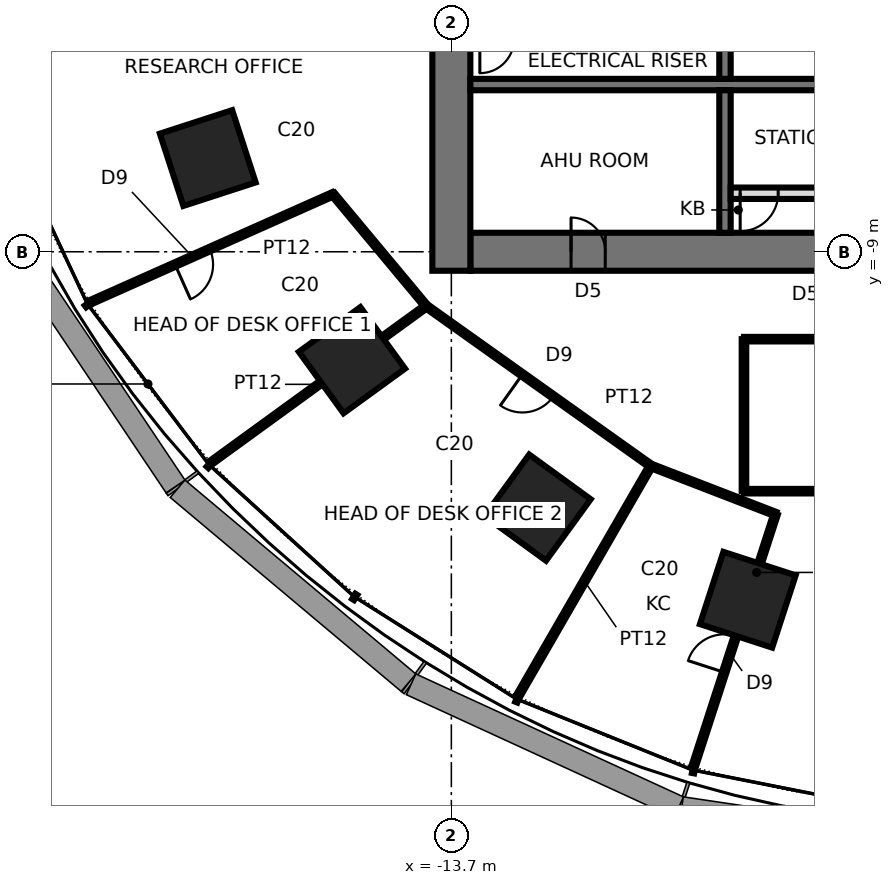
"""IFC4 building model, lengths in metres.
Left out: names, types, materials, properties, quantities, classifications, styles, units other than length and angle.
Written with IfcOpenShell. Run it as: python <this file> out.ifc"""

import sys

from ifc_helpers import new_model, si_unit, direction, frame, frame_2d, origin, origin_2d, place, context, subcontext, project, spatial, rectangle, extrude, element, fill, save


model = new_model("IFC4")
c1 = context("Model", 3, precision=1e-05, world=origin(), true_north=direction((0.0, 1.0)))
c2 = subcontext(c1, "Body", "Model", "MODEL_VIEW")
j1 = project(units=[si_unit("LENGTHUNIT", "METRE"), si_unit("PLANEANGLEUNIT", "RADIAN")], contexts=[c1])
p1 = place(None, origin())
s1 = spatial("IfcSite", under=j1, at=p1, CompositionType="ELEMENT")
p2 = place(p1, origin())
s2 = spatial("IfcBuilding", under=s1, at=p2, CompositionType="ELEMENT")
p3 = place(p2, frame((0.0, 0.0, 57.4)))
s3 = spatial("IfcBuildingStorey", under=s2, at=p3, CompositionType="ELEMENT", Elevation=57.4)
for number, where, z_axis, x_axis in (
    (1, (-20.109, -6.534, 0.0), (0.0, 0.0, 1.0), (-0.951, -0.309, 0.0)),
    (2, (-16.315, -11.854, 0.0), (0.0, 0.0, 1.0), (-0.809, -0.588, 0.0)),
    (3, (-11.43, -15.733, 0.0), (0.0, 0.0, 1.0), (-0.588, -0.809, 0.0)),
    (4, (-5.9, -18.157, 0.0), (0.0, 0.0, 1.0), (-0.309, -0.951, 0.0)),
):
    element("IfcColumn", number, at=place(p3, frame(where, z_axis=z_axis, x_axis=x_axis)), inside=s3, PredefinedType="COLUMN", context=c2, shape_type="SweptSolid", body=[
        extrude(rectangle(XDim=2.0, YDim=2.0, at=origin_2d()), origin(), (0.0, 0.0, 1.0), 4.2),
    ])
p4 = place(p3, frame((-13.2, -9.0, 0.0), z_axis=(0.0, 0.0, 1.0), x_axis=(1.0, 0.0, 0.0)))
e5 = element("IfcWall", 5, at=p4, inside=s3, PredefinedType="SHEAR", context=c2, shape_type="SweptSolid", body=[
    extrude(rectangle(XDim=26.4, YDim=1.0, at=frame_2d((13.2, 0.0))), origin(), (0.0, 0.0, 1.0), 4.2),
])
p5 = place(p4, frame((2.65, 0.0, 0.0)))
e6 = element("IfcOpeningElement", 6, at=p5, cuts=e5, PredefinedType="OPENING", context=c2, shape_type="SweptSolid", body=[
    extrude(rectangle(XDim=0.9, YDim=2.1, at=frame_2d((0.45, 1.05))), frame((0.0, 0.51, 0.0), z_axis=(0.0, -1.0, 0.0), x_axis=(1.0, 0.0, 0.0)), (0.0, 0.0, 1.0), 1.02),
])
p6 = place(p4, frame((9.5, 0.0, 0.0)))
e7 = element("IfcOpeningElement", 7, at=p6, cuts=e5, PredefinedType="OPENING", context=c2, shape_type="SweptSolid", body=[
    extrude(rectangle(XDim=0.9, YDim=2.1, at=frame_2d((0.45, 1.05))), frame((0.0, 0.51, 0.0), z_axis=(0.0, -1.0, 0.0), x_axis=(1.0, 0.0, 0.0)), (0.0, 0.0, 1.0), 1.02),
])
p7 = place(p4, frame((16.0, 0.0, 0.0)))
e8 = element("IfcOpeningElement", 8, at=p7, cuts=e5, PredefinedType="OPENING", context=c2, shape_type="SweptSolid", body=[
    extrude(rectangle(XDim=0.9, YDim=2.1, at=frame_2d((0.45, 1.05))), frame((0.0, 0.51, 0.0), z_axis=(0.0, -1.0, 0.0), x_axis=(1.0, 0.0, 0.0)), (0.0, 0.0, 1.0), 1.02),
])
p8 = place(p4, frame((22.85, 0.0, 0.0)))
e9 = element("IfcOpeningElement", 9, at=p8, cuts=e5, PredefinedType="OPENING", context=c2, shape_type="SweptSolid", body=[
    extrude(rectangle(XDim=0.9, YDim=2.1, at=frame_2d((0.45, 1.05))), frame((0.0, 0.51, 0.0), z_axis=(0.0, -1.0, 0.0), x_axis=(1.0, 0.0, 0.0)), (0.0, 0.0, 1.0), 1.02),
])
p9 = place(p3, frame((-13.7, 9.5, 0.0), z_axis=(0.0, 0.0, 1.0), x_axis=(0.0, -1.0, 0.0)))
e10 = element("IfcWall", 10, at=p9, inside=s3, PredefinedType="SHEAR", context=c2, shape_type="SweptSolid", body=[
    extrude(rectangle(XDim=19.0, YDim=1.0, at=frame_2d((9.5, 0.0))), origin(), (0.0, 0.0, 1.0), 4.2),
])
p10 = place(p9, frame((8.6, 0.0, 0.0)))
e11 = element("IfcOpeningElement", 11, at=p10, cuts=e10, PredefinedType="OPENING", context=c2, shape_type="SweptSolid", body=[
    extrude(rectangle(XDim=1.8, YDim=2.4, at=frame_2d((0.9, 1.2))), frame((0.0, 0.51, 0.0), z_axis=(0.0, -1.0, 0.0), x_axis=(1.0, 0.0, 0.0)), (0.0, 0.0, 1.0), 1.02),
])
p11 = place(p3, frame((-13.2, -4.6, 0.0), z_axis=(0.0, 0.0, 1.0), x_axis=(1.0, 0.0, 0.0)))
e12 = element("IfcWall", 12, at=p11, inside=s3, PredefinedType="SHEAR", context=c2, shape_type="SweptSolid", body=[
    extrude(rectangle(XDim=26.4, YDim=0.3, at=frame_2d((13.2, 0.0))), origin(), (0.0, 0.0, 1.0), 4.2),
])
p12 = place(p3, frame((-6.5, -1.75, 0.0), z_axis=(0.0, 0.0, 1.0), x_axis=(0.0, -1.0, 0.0)))
e13 = element("IfcWall", 13, at=p12, inside=s3, PredefinedType="SHEAR", context=c2, shape_type="SweptSolid", body=[
    extrude(rectangle(XDim=2.7, YDim=0.3, at=frame_2d((1.35, 0.0))), origin(), (0.0, 0.0, 1.0), 4.2),
])
p13 = place(p3, frame((-6.5, -4.75, 0.0), z_axis=(0.0, 0.0, 1.0), x_axis=(0.0, -1.0, 0.0)))
e14 = element("IfcWall", 14, at=p13, inside=s3, PredefinedType="SHEAR", context=c2, shape_type="SweptSolid", body=[
    extrude(rectangle(XDim=3.75, YDim=0.3, at=frame_2d((1.875, 0.0))), origin(), (0.0, 0.0, 1.0), 4.2),
])
p14 = place(p3, frame((-6.35, -7.46, 0.0), z_axis=(0.0, 0.0, 1.0), x_axis=(1.0, 0.0, 0.0)))
e15 = element("IfcWall", 15, at=p14, inside=s3, PredefinedType="PARTITIONING", context=c2, shape_type="SweptSolid", body=[
    extrude(rectangle(XDim=6.2, YDim=0.3, at=frame_2d((3.1, 0.0))), origin(), (0.0, 0.0, 1.0), 4.04),
])
p15 = place(p14, frame((0.25, 0.0, 0.0)))
e16 = element("IfcOpeningElement", 16, at=p15, cuts=e15, PredefinedType="OPENING", context=c2, shape_type="SweptSolid", body=[
    extrude(rectangle(XDim=1.0, YDim=2.4, at=frame_2d((0.5, 1.2))), frame((0.0, 0.16, 0.0), z_axis=(0.0, -1.0, 0.0), x_axis=(1.0, 0.0, 0.0)), (0.0, 0.0, 1.0), 0.32),
])
p16 = place(p3, frame((-16.813, -7.486, 0.0), z_axis=(0.0, 0.0, 1.0), x_axis=(-0.913543837108, -0.406740282837, 0.0)))
e17 = element("IfcWall", 17, at=p16, inside=s3, PredefinedType="PARTITIONING", context=c2, shape_type="SweptSolid", body=[
    extrude(rectangle(XDim=7.0, YDim=0.12, at=frame_2d((3.5, 0.0))), origin(), (0.0, 0.0, 1.0), 4.04),
])
p17 = place(p16, frame((3.55, 0.0, 0.0)))
e18 = element("IfcOpeningElement", 18, at=p17, cuts=e17, PredefinedType="OPENING", context=c2, shape_type="SweptSolid", body=[
    extrude(rectangle(XDim=1.0, YDim=2.4, at=frame_2d((0.5, 1.2))), frame((0.0, 0.07, 0.0), z_axis=(0.0, -1.0, 0.0), x_axis=(1.0, 0.0, 0.0)), (0.0, 0.0, 1.0), 0.14),
])
p18 = place(p3, frame((-14.358, -10.431, 0.0), z_axis=(0.0, 0.0, 1.0), x_axis=(-0.640365972165, 0.768069932814, 0.0)))
e19 = element("IfcWall", 19, at=p18, inside=s3, PredefinedType="PARTITIONING", context=c2, shape_type="SweptSolid", body=[
    extrude(rectangle(XDim=3.835, YDim=0.12, at=frame_2d((1.917, 0.0))), origin(), (0.0, 0.0, 1.0), 4.04),
])
p19 = place(p3, frame((-14.358, -10.431, 0.0), z_axis=(0.0, 0.0, 1.0), x_axis=(-0.809015012105, -0.587787980643, 0.0)))
e20 = element("IfcWall", 20, at=p19, inside=s3, PredefinedType="PARTITIONING", context=c2, shape_type="SweptSolid", body=[
    extrude(rectangle(XDim=7.0, YDim=0.12, at=frame_2d((3.5, 0.0))), origin(), (0.0, 0.0, 1.0), 2.84),
])
p20 = place(p3, frame((-8.449, -14.635, 0.0), z_axis=(0.0, 0.0, 1.0), x_axis=(-0.814853539304, 0.57966689528, 0.0)))
e21 = element("IfcWall", 21, at=p20, inside=s3, PredefinedType="PARTITIONING", context=c2, shape_type="SweptSolid", body=[
    extrude(rectangle(XDim=7.251, YDim=0.12, at=frame_2d((3.625, 0.0))), origin(), (0.0, 0.0, 1.0), 4.04),
])
p21 = place(p20, frame((3.15, 0.0, 0.0)))
e22 = element("IfcOpeningElement", 22, at=p21, cuts=e21, PredefinedType="OPENING", context=c2, shape_type="SweptSolid", body=[
    extrude(rectangle(XDim=1.0, YDim=2.4, at=frame_2d((0.5, 1.2))), frame((0.0, 0.07, 0.0), z_axis=(0.0, -1.0, 0.0), x_axis=(1.0, 0.0, 0.0)), (0.0, 0.0, 1.0), 0.14),
])
p22 = place(p3, frame((-8.449, -14.635, 0.0), z_axis=(0.0, 0.0, 1.0), x_axis=(-0.499995173006, -0.866028190633, 0.0)))
e23 = element("IfcWall", 23, at=p22, inside=s3, PredefinedType="PARTITIONING", context=c2, shape_type="SweptSolid", body=[
    extrude(rectangle(XDim=7.0, YDim=0.12, at=frame_2d((3.5, 0.0))), origin(), (0.0, 0.0, 1.0), 4.04),
])
p23 = place(p3, frame((-6.0, -11.3, 0.0), z_axis=(0.0, 0.0, 1.0), x_axis=(0.0, -1.0, 0.0)))
e24 = element("IfcWall", 24, at=p23, inside=s3, PredefinedType="PARTITIONING", context=c2, shape_type="SweptSolid", body=[
    extrude(rectangle(XDim=4.0, YDim=0.12, at=frame_2d((2.0, 0.0))), origin(), (0.0, 0.0, 1.0), 4.04),
])
p24 = place(p3, frame((-5.167, -15.903, 0.0), z_axis=(0.0, 0.0, 1.0), x_axis=(-0.932804495801, 0.360382813983, 0.0)))
e25 = element("IfcWall", 25, at=p24, inside=s3, PredefinedType="PARTITIONING", context=c2, shape_type="SweptSolid", body=[
    extrude(rectangle(XDim=3.519, YDim=0.12, at=frame_2d((1.759, 0.0))), origin(), (0.0, 0.0, 1.0), 4.04),
])
p25 = place(p3, frame((-7.33, -22.56, 0.0), z_axis=(0.0, 0.0, 1.0), x_axis=(0.309009574742, 0.951058927048, 0.0)))
e26 = element("IfcWall", 26, at=p25, inside=s3, PredefinedType="PARTITIONING", context=c2, shape_type="SweptSolid", body=[
    extrude(rectangle(XDim=7.0, YDim=0.12, at=frame_2d((3.5, 0.0))), origin(), (0.0, 0.0, 1.0), 2.84),
])
p26 = place(p25, frame((2.621, 0.0, 0.0)))
e27 = element("IfcOpeningElement", 27, at=p26, cuts=e26, PredefinedType="OPENING", context=c2, shape_type="SweptSolid", body=[
    extrude(rectangle(XDim=1.0, YDim=2.4, at=frame_2d((0.5, 1.2))), frame((0.0, 0.07, 0.0), z_axis=(0.0, -1.0, 0.0), x_axis=(1.0, 0.0, 0.0)), (0.0, 0.0, 1.0), 0.14),
])
p27 = place(p3, frame((2.0, -11.3, 0.0), z_axis=(0.0, 0.0, 1.0), x_axis=(-1.0, 0.0, 0.0)))
e28 = element("IfcWall", 28, at=p27, inside=s3, PredefinedType="PARTITIONING", context=c2, shape_type="SweptSolid", body=[
    extrude(rectangle(XDim=8.0, YDim=0.12, at=frame_2d((4.0, 0.0))), origin(), (0.0, 0.0, 1.0), 4.04),
])
p28 = place(p27, frame((3.5, 0.0, 0.0)))
e29 = element("IfcOpeningElement", 29, at=p28, cuts=e28, PredefinedType="OPENING", context=c2, shape_type="SweptSolid", body=[
    extrude(rectangle(XDim=1.0, YDim=2.4, at=frame_2d((0.5, 1.2))), frame((0.0, 0.07, 0.0), z_axis=(0.0, -1.0, 0.0), x_axis=(1.0, 0.0, 0.0)), (0.0, 0.0, 1.0), 0.14),
])
p29 = place(p3, frame((-6.0, -15.3, 0.0), z_axis=(0.0, 0.0, 1.0), x_axis=(1.0, 0.0, 0.0)))
e30 = element("IfcWall", 30, at=p29, inside=s3, PredefinedType="PARTITIONING", context=c2, shape_type="SweptSolid", body=[
    extrude(rectangle(XDim=8.0, YDim=0.12, at=frame_2d((4.0, 0.0))), origin(), (0.0, 0.0, 1.0), 3.586),
])
p30 = place(p5, origin())
e31 = element("IfcDoor", 31, at=p30, inside=s3, OperationType="SINGLE_SWING_LEFT", PredefinedType="DOOR", context=c2, shape_type="SweptSolid", body=[
    extrude(rectangle(XDim=0.82, YDim=2.06, at=frame_2d((0.45, 1.03))), frame((0.0, 0.025, 0.0), z_axis=(0.0, -1.0, 0.0), x_axis=(1.0, 0.0, 0.0)), (0.0, 0.0, 1.0), 0.05),
    extrude(rectangle(XDim=0.04, YDim=2.1, at=frame_2d((0.02, 1.05))), frame((0.0, 0.25, 0.0), z_axis=(0.0, -1.0, 0.0), x_axis=(1.0, 0.0, 0.0)), (0.0, 0.0, 1.0), 0.5),
    extrude(rectangle(XDim=0.04, YDim=2.1, at=frame_2d((0.88, 1.05))), frame((0.0, 0.25, 0.0), z_axis=(0.0, -1.0, 0.0), x_axis=(1.0, 0.0, 0.0)), (0.0, 0.0, 1.0), 0.5),
    extrude(rectangle(XDim=0.82, YDim=0.04, at=frame_2d((0.45, 2.08))), frame((0.0, 0.25, 0.0), z_axis=(0.0, -1.0, 0.0), x_axis=(1.0, 0.0, 0.0)), (0.0, 0.0, 1.0), 0.5),
])
fill(e6, e31)
p31 = place(p15, frame((1.0, 0.0, 0.0), z_axis=(0.0, 0.0, 1.0), x_axis=(-1.0, 0.0, 0.0)))
e32 = element("IfcDoor", 32, at=p31, inside=s3, OperationType="SINGLE_SWING_RIGHT", PredefinedType="DOOR", context=c2, shape_type="SweptSolid", body=[
    extrude(rectangle(XDim=1.0, YDim=2.4, at=frame_2d((0.5, 1.2))), frame((0.0, 0.025, 0.0), z_axis=(0.0, -1.0, 0.0), x_axis=(1.0, 0.0, 0.0)), (0.0, 0.0, 1.0), 0.05),
])
fill(e16, e32)
p32 = place(p17, origin())
e33 = element("IfcDoor", 33, at=p32, inside=s3, OperationType="SINGLE_SWING_RIGHT", PredefinedType="DOOR", context=c2, shape_type="SweptSolid", body=[
    extrude(rectangle(XDim=1.0, YDim=2.4, at=frame_2d((0.5, 1.2))), frame((0.0, 0.025, 0.0), z_axis=(0.0, -1.0, 0.0), x_axis=(1.0, 0.0, 0.0)), (0.0, 0.0, 1.0), 0.05),
])
fill(e18, e33)
p33 = place(p21, origin())
e34 = element("IfcDoor", 34, at=p33, inside=s3, OperationType="SINGLE_SWING_RIGHT", PredefinedType="DOOR", context=c2, shape_type="SweptSolid", body=[
    extrude(rectangle(XDim=1.0, YDim=2.4, at=frame_2d((0.5, 1.2))), frame((0.0, 0.025, 0.0), z_axis=(0.0, -1.0, 0.0), x_axis=(1.0, 0.0, 0.0)), (0.0, 0.0, 1.0), 0.05),
])
fill(e22, e34)
p34 = place(p26, origin())
e35 = element("IfcDoor", 35, at=p34, inside=s3, OperationType="SINGLE_SWING_LEFT", PredefinedType="DOOR", context=c2, shape_type="SweptSolid", body=[
    extrude(rectangle(XDim=1.0, YDim=2.4, at=frame_2d((0.5, 1.2))), frame((0.0, 0.025, 0.0), z_axis=(0.0, -1.0, 0.0), x_axis=(1.0, 0.0, 0.0)), (0.0, 0.0, 1.0), 0.05),
])
fill(e27, e35)
save(model, sys.argv[1])
